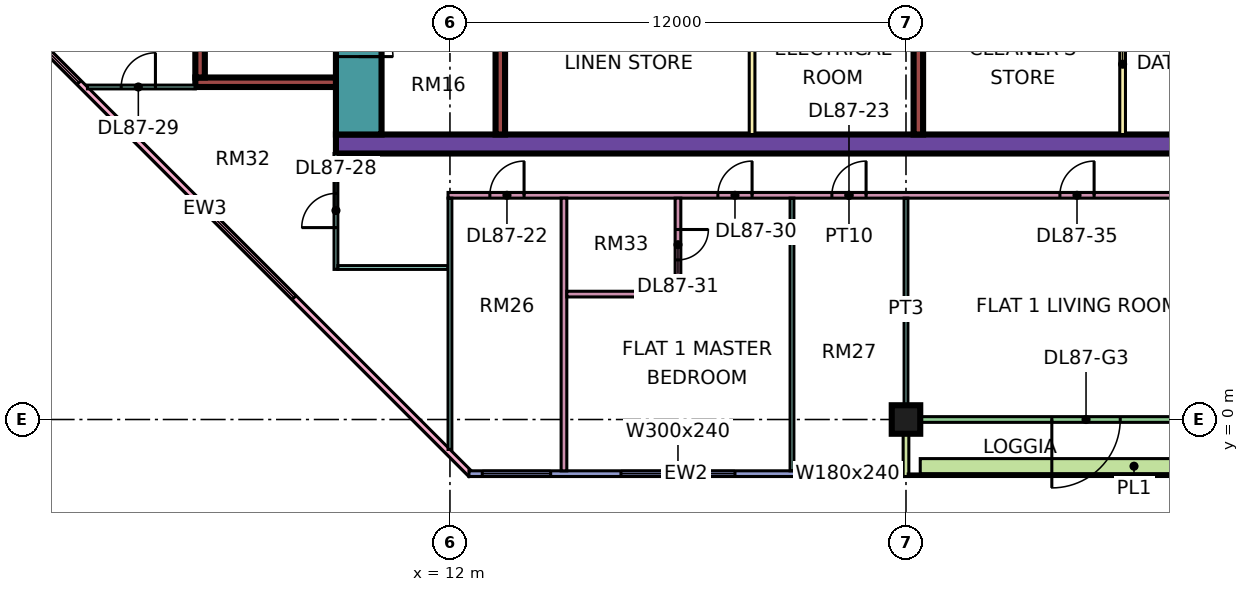
"""IFC4 building model, lengths in metres.
Left out: names, types, materials, properties, quantities, classifications, styles, units other than length and angle.
Written with IfcOpenShell. Run it as: python <this file> out.ifc"""

import sys

from ifc_helpers import new_model, si_unit, direction, frame, frame_2d, origin, origin_2d, place, context, subcontext, project, spatial, rectangle, extrude, element, fill, save


model = new_model("IFC4")
c1 = context("Model", 3, precision=1e-05, world=origin(), true_north=direction((0.0, 1.0)))
c2 = subcontext(c1, "Body", "Model", "MODEL_VIEW")
j1 = project(units=[si_unit("LENGTHUNIT", "METRE"), si_unit("PLANEANGLEUNIT", "RADIAN")], contexts=[c1])
p1 = place(None, origin())
s1 = spatial("IfcSite", under=j1, at=p1, CompositionType="ELEMENT")
p2 = place(p1, origin())
s2 = spatial("IfcBuilding", under=s1, at=p2, CompositionType="ELEMENT")
p3 = place(p2, frame((0.0, 0.0, 372.65)))
s3 = spatial("IfcBuildingStorey", under=s2, at=p3, CompositionType="ELEMENT", Elevation=372.65)
p4 = place(p3, frame((24.0, 0.0, 0.0), z_axis=(0.0, 0.0, 1.0), x_axis=(1.0, 0.0, 0.0)))
e1 = element("IfcColumn", 1, at=p4, inside=s3, PredefinedType="COLUMN", context=c2, shape_type="SweptSolid", body=[
    extrude(rectangle(XDim=0.75, YDim=0.75, at=origin_2d()), origin(), (0.0, 0.0, 1.0), 3.75),
])
p5 = place(p3, frame((9.0, 7.25, 0.0), z_axis=(0.0, 0.0, 1.0), x_axis=(1.0, 0.0, 0.0)))
e2 = element("IfcWall", 2, at=p5, inside=s3, PredefinedType="SHEAR", context=c2, shape_type="SweptSolid", body=[
    extrude(rectangle(XDim=25.0, YDim=0.5, at=frame_2d((12.5, 0.0))), origin(), (0.0, 0.0, 1.0), 3.75),
])
p6 = place(p3, frame((9.6, 7.5, 0.0), z_axis=(0.0, 0.0, 1.0), x_axis=(0.0, 1.0, 0.0)))
e3 = element("IfcWall", 3, at=p6, inside=s3, PredefinedType="SHEAR", context=c2, shape_type="SweptSolid", body=[
    extrude(rectangle(XDim=12.0, YDim=1.2, at=frame_2d((6.0, 0.0))), origin(), (0.0, 0.0, 1.0), 3.75),
])
p7 = place(p6, frame((4.375, 0.0, 0.0)))
e4 = element("IfcOpeningElement", 4, at=p7, cuts=e3, PredefinedType="OPENING", context=c2, shape_type="SweptSolid", body=[
    extrude(rectangle(XDim=1.1, YDim=2.2, at=frame_2d((0.55, 1.1))), frame((0.0, 0.61, 0.0), z_axis=(0.0, -1.0, 0.0), x_axis=(1.0, 0.0, 0.0)), (0.0, 0.0, 1.0), 1.22),
])
p8 = place(p6, frame((6.875, 0.0, 0.0)))
e5 = element("IfcOpeningElement", 5, at=p8, cuts=e3, PredefinedType="OPENING", context=c2, shape_type="SweptSolid", body=[
    extrude(rectangle(XDim=1.1, YDim=2.2, at=frame_2d((0.55, 1.1))), frame((0.0, 0.61, 0.0), z_axis=(0.0, -1.0, 0.0), x_axis=(1.0, 0.0, 0.0)), (0.0, 0.0, 1.0), 1.22),
])
p9 = place(p6, frame((9.85, 0.0, 0.0)))
e6 = element("IfcOpeningElement", 6, at=p9, cuts=e3, PredefinedType="OPENING", context=c2, shape_type="SweptSolid", body=[
    extrude(rectangle(XDim=1.1, YDim=2.2, at=frame_2d((0.55, 1.1))), frame((0.0, 0.61, 0.0), z_axis=(0.0, -1.0, 0.0), x_axis=(1.0, 0.0, 0.0)), (0.0, 0.0, 1.0), 1.22),
])
p10 = place(p6, frame((2.05, 0.0, 0.0)))
e7 = element("IfcOpeningElement", 7, at=p10, cuts=e3, PredefinedType="OPENING", context=c2, shape_type="SweptSolid", body=[
    extrude(rectangle(XDim=0.9, YDim=2.1, at=frame_2d((0.45, 1.05))), frame((0.0, 0.61, 0.0), z_axis=(0.0, -1.0, 0.0), x_axis=(1.0, 0.0, 0.0)), (0.0, 0.0, 1.0), 1.22),
])
p11 = place(p3, frame((13.325, 7.5, 0.0), z_axis=(0.0, 0.0, 1.0), x_axis=(0.0, 1.0, 0.0)))
e8 = element("IfcWall", 8, at=p11, inside=s3, PredefinedType="SHEAR", context=c2, shape_type="SweptSolid", body=[
    extrude(rectangle(XDim=12.0, YDim=0.25, at=frame_2d((6.0, 0.0))), origin(), (0.0, 0.0, 1.0), 3.75),
])
for number, where, z_axis, x_axis in (
    (9, (24.325, 7.5, 0.0), (0.0, 0.0, 1.0), (0.0, 1.0, 0.0)),
    (10, (5.3, 8.875, 0.0), (0.0, 0.0, 1.0), (1.0, 0.0, 0.0)),
):
    element("IfcWall", number, at=place(p3, frame(where, z_axis=z_axis, x_axis=x_axis)), inside=s3, PredefinedType="SHEAR", context=c2, shape_type="SweptSolid", body=[
        extrude(rectangle(XDim=3.7, YDim=0.25, at=frame_2d((1.85, 0.0))), origin(), (0.0, 0.0, 1.0), 3.75),
    ])
p12 = place(p3, frame((5.425, 9.0, 0.0), z_axis=(0.0, 0.0, 1.0), x_axis=(0.0, 1.0, 0.0)))
e11 = element("IfcWall", 11, at=p12, inside=s3, PredefinedType="SHEAR", context=c2, shape_type="SweptSolid", body=[
    extrude(rectangle(XDim=4.0, YDim=0.25, at=frame_2d((2.0, 0.0))), origin(), (0.0, 0.0, 1.0), 3.75),
])
p13 = place(p3, frame((-1.447, 12.553, 0.0), z_axis=(0.0, 0.0, 1.0), x_axis=(0.707106781187, -0.707106781187, 0.0)))
e12 = element("IfcWall", 12, at=p13, inside=s3, PredefinedType="SOLIDWALL", context=c2, shape_type="SweptSolid", body=[
    extrude(rectangle(XDim=19.799, YDim=0.15, at=frame_2d((9.899, 0.0))), origin(), (0.0, 0.0, 1.0), 3.35),
])
p14 = place(p13, frame((2.212, 0.0, 0.45)))
e13 = element("IfcOpeningElement", 13, at=p14, cuts=e12, PredefinedType="OPENING", context=c2, shape_type="SweptSolid", body=[
    extrude(rectangle(XDim=3.0, YDim=2.4, at=frame_2d((1.5, 1.2))), frame((0.0, 0.085, 0.0), z_axis=(0.0, -1.0, 0.0), x_axis=(1.0, 0.0, 0.0)), (0.0, 0.0, 1.0), 0.17),
])
p15 = place(p13, frame((10.216, 0.0, 0.45)))
e14 = element("IfcOpeningElement", 14, at=p15, cuts=e12, PredefinedType="OPENING", context=c2, shape_type="SweptSolid", body=[
    extrude(rectangle(XDim=3.0, YDim=2.4, at=frame_2d((1.5, 1.2))), frame((0.0, 0.085, 0.0), z_axis=(0.0, -1.0, 0.0), x_axis=(1.0, 0.0, 0.0)), (0.0, 0.0, 1.0), 0.17),
])
p16 = place(p3, frame((12.5, -1.425, 0.0), z_axis=(0.0, 0.0, 1.0), x_axis=(1.0, 0.0, 0.0)))
e15 = element("IfcWall", 15, at=p16, inside=s3, PredefinedType="SOLIDWALL", context=c2, shape_type="SweptSolid", body=[
    extrude(rectangle(XDim=11.425, YDim=0.15, at=frame_2d((5.712, 0.0))), origin(), (0.0, 0.0, 1.0), 3.35),
])
p17 = place(p16, frame((0.35, 0.0, 0.45)))
e16 = element("IfcOpeningElement", 16, at=p17, cuts=e15, PredefinedType="OPENING", context=c2, shape_type="SweptSolid", body=[
    extrude(rectangle(XDim=1.8, YDim=2.4, at=frame_2d((0.9, 1.2))), frame((0.0, 0.085, 0.0), z_axis=(0.0, -1.0, 0.0), x_axis=(1.0, 0.0, 0.0)), (0.0, 0.0, 1.0), 0.17),
])
p18 = place(p16, frame((4.0, 0.0, 0.45)))
e17 = element("IfcOpeningElement", 17, at=p18, cuts=e15, PredefinedType="OPENING", context=c2, shape_type="SweptSolid", body=[
    extrude(rectangle(XDim=3.0, YDim=2.4, at=frame_2d((1.5, 1.2))), frame((0.0, 0.085, 0.0), z_axis=(0.0, -1.0, 0.0), x_axis=(1.0, 0.0, 0.0)), (0.0, 0.0, 1.0), 0.17),
])
p19 = place(p16, frame((9.062, 0.0, 0.45)))
e18 = element("IfcOpeningElement", 18, at=p19, cuts=e15, PredefinedType="OPENING", context=c2, shape_type="SweptSolid", body=[
    extrude(rectangle(XDim=1.8, YDim=2.4, at=frame_2d((0.9, 1.2))), frame((0.0, 0.085, 0.0), z_axis=(0.0, -1.0, 0.0), x_axis=(1.0, 0.0, 0.0)), (0.0, 0.0, 1.0), 0.17),
])
p20 = place(p3, frame((24.075, 0.0, 0.0), z_axis=(0.0, 0.0, 1.0), x_axis=(1.0, 0.0, 0.0)))
e19 = element("IfcWall", 19, at=p20, inside=s3, PredefinedType="SOLIDWALL", context=c2, shape_type="SweptSolid", body=[
    extrude(rectangle(XDim=11.85, YDim=0.15, at=frame_2d((5.925, 0.0))), origin(), (0.0, 0.0, 1.0), 3.35),
])
p21 = place(p20, frame((3.762, 0.0, 0.0)))
e20 = element("IfcOpeningElement", 20, at=p21, cuts=e19, PredefinedType="OPENING", context=c2, shape_type="SweptSolid", body=[
    extrude(rectangle(XDim=1.8, YDim=2.4, at=frame_2d((0.9, 1.2))), frame((0.0, 0.085, 0.0), z_axis=(0.0, -1.0, 0.0), x_axis=(1.0, 0.0, 0.0)), (0.0, 0.0, 1.0), 0.17),
])
p22 = place(p20, frame((9.288, 0.0, 0.45)))
e21 = element("IfcOpeningElement", 21, at=p22, cuts=e19, PredefinedType="OPENING", context=c2, shape_type="SweptSolid", body=[
    extrude(rectangle(XDim=1.8, YDim=2.4, at=frame_2d((0.9, 1.2))), frame((0.0, 0.085, 0.0), z_axis=(0.0, -1.0, 0.0), x_axis=(1.0, 0.0, 0.0)), (0.0, 0.0, 1.0), 0.17),
])
p23 = place(p3, frame((24.0, -1.5, 0.0), z_axis=(0.0, 0.0, 1.0), x_axis=(0.0, 1.0, 0.0)))
e22 = element("IfcWall", 22, at=p23, inside=s3, PredefinedType="SOLIDWALL", context=c2, shape_type="SweptSolid", body=[
    extrude(rectangle(XDim=1.5, YDim=0.15, at=frame_2d((0.75, 0.0))), origin(), (0.0, 0.0, 1.0), 3.35),
])
p24 = place(p3, frame((24.375, -1.229, 0.0), z_axis=(0.0, 0.0, 1.0), x_axis=(1.0, 0.0, 0.0)))
e23 = element("IfcWall", 23, at=p24, inside=s3, PredefinedType="SOLIDWALL", context=c2, shape_type="SweptSolid", body=[
    extrude(rectangle(XDim=11.25, YDim=0.4, at=frame_2d((5.625, 0.0))), origin(), (0.0, 0.0, 1.0), 0.7),
])
for number, where, z_axis, x_axis in (
    (24, (19.95, 7.5, 0.0), (0.0, 0.0, 1.0), (0.0, 1.0, 0.0)),
    (25, (29.7, 7.5, 0.0), (0.0, 0.0, 1.0), (0.0, 1.0, 0.0)),
):
    element("IfcWall", number, at=place(p3, frame(where, z_axis=z_axis, x_axis=x_axis)), inside=s3, PredefinedType="PARTITIONING", context=c2, shape_type="SweptSolid", body=[
        extrude(rectangle(XDim=3.7, YDim=0.15, at=frame_2d((1.85, 0.0))), origin(), (0.0, 0.0, 1.0), 3.35),
    ])
p25 = place(p3, frame((2.461, 8.75, 0.0), z_axis=(0.0, 0.0, 1.0), x_axis=(1.0, 0.0, 0.0)))
e26 = element("IfcWall", 26, at=p25, inside=s3, PredefinedType="PARTITIONING", context=c2, shape_type="SweptSolid", body=[
    extrude(rectangle(XDim=2.839, YDim=0.1, at=frame_2d((1.419, 0.0))), origin(), (0.0, 0.0, 1.0), 3.35),
])
p26 = place(p25, frame((0.889, 0.0, 0.0)))
e27 = element("IfcOpeningElement", 27, at=p26, cuts=e26, PredefinedType="OPENING", context=c2, shape_type="SweptSolid", body=[
    extrude(rectangle(XDim=0.9, YDim=2.1, at=frame_2d((0.45, 1.05))), frame((0.0, 0.06, 0.0), z_axis=(0.0, -1.0, 0.0), x_axis=(1.0, 0.0, 0.0)), (0.0, 0.0, 1.0), 0.12),
])
p27 = place(p3, frame((9.0, 3.95, 0.0), z_axis=(0.0, 0.0, 1.0), x_axis=(0.0, 1.0, 0.0)))
e28 = element("IfcWall", 28, at=p27, inside=s3, PredefinedType="PARTITIONING", context=c2, shape_type="SweptSolid", body=[
    extrude(rectangle(XDim=3.05, YDim=0.1, at=frame_2d((1.525, 0.0))), origin(), (0.0, 0.0, 1.0), 3.35),
])
p28 = place(p27, frame((1.1, 0.0, 0.0)))
e29 = element("IfcOpeningElement", 29, at=p28, cuts=e28, PredefinedType="OPENING", context=c2, shape_type="SweptSolid", body=[
    extrude(rectangle(XDim=0.9, YDim=2.1, at=frame_2d((0.45, 1.05))), frame((0.0, 0.06, 0.0), z_axis=(0.0, -1.0, 0.0), x_axis=(1.0, 0.0, 0.0)), (0.0, 0.0, 1.0), 0.12),
])
p29 = place(p3, frame((9.05, 4.0, 0.0), z_axis=(0.0, 0.0, 1.0), x_axis=(1.0, 0.0, 0.0)))
e30 = element("IfcWall", 30, at=p29, inside=s3, PredefinedType="PARTITIONING", context=c2, shape_type="SweptSolid", body=[
    extrude(rectangle(XDim=2.9, YDim=0.1, at=frame_2d((1.45, 0.0))), origin(), (0.0, 0.0, 1.0), 3.35),
])
p30 = place(p3, frame((11.95, 5.9, 0.0), z_axis=(0.0, 0.0, 1.0), x_axis=(1.0, 0.0, 0.0)))
e31 = element("IfcWall", 31, at=p30, inside=s3, PredefinedType="PARTITIONING", context=c2, shape_type="SweptSolid", body=[
    extrude(rectangle(XDim=21.1, YDim=0.15, at=frame_2d((10.55, 0.0))), origin(), (0.0, 0.0, 1.0), 3.35),
])
p31 = place(p30, frame((1.1, 0.0, 0.0)))
e32 = element("IfcOpeningElement", 32, at=p31, cuts=e31, PredefinedType="OPENING", context=c2, shape_type="SweptSolid", body=[
    extrude(rectangle(XDim=0.9, YDim=2.1, at=frame_2d((0.45, 1.05))), frame((0.0, 0.085, 0.0), z_axis=(0.0, -1.0, 0.0), x_axis=(1.0, 0.0, 0.0)), (0.0, 0.0, 1.0), 0.17),
])
p32 = place(p30, frame((10.1, 0.0, 0.0)))
e33 = element("IfcOpeningElement", 33, at=p32, cuts=e31, PredefinedType="OPENING", context=c2, shape_type="SweptSolid", body=[
    extrude(rectangle(XDim=0.9, YDim=2.1, at=frame_2d((0.45, 1.05))), frame((0.0, 0.085, 0.0), z_axis=(0.0, -1.0, 0.0), x_axis=(1.0, 0.0, 0.0)), (0.0, 0.0, 1.0), 0.17),
])
p33 = place(p30, frame((7.1, 0.0, 0.0)))
e34 = element("IfcOpeningElement", 34, at=p33, cuts=e31, PredefinedType="OPENING", context=c2, shape_type="SweptSolid", body=[
    extrude(rectangle(XDim=0.9, YDim=2.1, at=frame_2d((0.45, 1.05))), frame((0.0, 0.085, 0.0), z_axis=(0.0, -1.0, 0.0), x_axis=(1.0, 0.0, 0.0)), (0.0, 0.0, 1.0), 0.17),
])
p34 = place(p30, frame((16.1, 0.0, 0.0)))
e35 = element("IfcOpeningElement", 35, at=p34, cuts=e31, PredefinedType="OPENING", context=c2, shape_type="SweptSolid", body=[
    extrude(rectangle(XDim=0.9, YDim=2.1, at=frame_2d((0.45, 1.05))), frame((0.0, 0.085, 0.0), z_axis=(0.0, -1.0, 0.0), x_axis=(1.0, 0.0, 0.0)), (0.0, 0.0, 1.0), 0.17),
])
p35 = place(p3, frame((12.0, -0.788, 0.0), z_axis=(0.0, 0.0, 1.0), x_axis=(0.0, 1.0, 0.0)))
e36 = element("IfcWall", 36, at=p35, inside=s3, PredefinedType="PARTITIONING", context=c2, shape_type="SweptSolid", body=[
    extrude(rectangle(XDim=6.613, YDim=0.1, at=frame_2d((3.306, 0.0))), origin(), (0.0, 0.0, 1.0), 3.35),
])
p36 = place(p3, frame((15.0, -1.351, 0.0), z_axis=(0.0, 0.0, 1.0), x_axis=(0.0, 1.0, 0.0)))
e37 = element("IfcWall", 37, at=p36, inside=s3, PredefinedType="PARTITIONING", context=c2, shape_type="SweptSolid", body=[
    extrude(rectangle(XDim=7.176, YDim=0.15, at=frame_2d((3.588, 0.0))), origin(), (0.0, 0.0, 1.0), 3.35),
])
p37 = place(p3, frame((15.075, 3.3, 0.0), z_axis=(0.0, 0.0, 1.0), x_axis=(1.0, 0.0, 0.0)))
e38 = element("IfcWall", 38, at=p37, inside=s3, PredefinedType="PARTITIONING", context=c2, shape_type="SweptSolid", body=[
    extrude(rectangle(XDim=3.0, YDim=0.15, at=frame_2d((1.5, 0.0))), origin(), (0.0, 0.0, 1.0), 3.35),
])
p38 = place(p3, frame((18.0, 3.375, 0.0), z_axis=(0.0, 0.0, 1.0), x_axis=(0.0, 1.0, 0.0)))
e39 = element("IfcWall", 39, at=p38, inside=s3, PredefinedType="PARTITIONING", context=c2, shape_type="SweptSolid", body=[
    extrude(rectangle(XDim=2.45, YDim=0.15, at=frame_2d((1.225, 0.0))), origin(), (0.0, 0.0, 1.0), 3.35),
])
p39 = place(p38, frame((0.825, 0.0, 0.0)))
e40 = element("IfcOpeningElement", 40, at=p39, cuts=e39, PredefinedType="OPENING", context=c2, shape_type="SweptSolid", body=[
    extrude(rectangle(XDim=0.8, YDim=2.1, at=frame_2d((0.4, 1.05))), frame((0.0, 0.085, 0.0), z_axis=(0.0, -1.0, 0.0), x_axis=(1.0, 0.0, 0.0)), (0.0, 0.0, 1.0), 0.17),
])
p40 = place(p3, frame((21.0, -1.351, 0.0), z_axis=(0.0, 0.0, 1.0), x_axis=(0.0, 1.0, 0.0)))
e41 = element("IfcWall", 41, at=p40, inside=s3, PredefinedType="PARTITIONING", context=c2, shape_type="SweptSolid", body=[
    extrude(rectangle(XDim=7.176, YDim=0.1, at=frame_2d((3.588, 0.0))), origin(), (0.0, 0.0, 1.0), 3.35),
])
p41 = place(p3, frame((24.0, 0.0, 0.0), z_axis=(0.0, 0.0, 1.0), x_axis=(0.0, 1.0, 0.0)))
e42 = element("IfcWall", 42, at=p41, inside=s3, PredefinedType="PARTITIONING", context=c2, shape_type="SweptSolid", body=[
    extrude(rectangle(XDim=5.825, YDim=0.1, at=frame_2d((2.913, 0.0))), origin(), (0.0, 0.0, 1.0), 3.35),
])
p42 = place(p14, origin())
e43 = element("IfcWindow", 43, at=p42, inside=s3, PartitioningType="SINGLE_PANEL", PredefinedType="WINDOW", context=c2, shape_type="SweptSolid", body=[
    extrude(rectangle(XDim=3.0, YDim=2.4, at=frame_2d((1.5, 1.2))), frame((0.0, 0.03, 0.0), z_axis=(0.0, -1.0, 0.0), x_axis=(1.0, 0.0, 0.0)), (0.0, 0.0, 1.0), 0.06),
])
fill(e13, e43)
p43 = place(p15, origin())
e44 = element("IfcWindow", 44, at=p43, inside=s3, PartitioningType="SINGLE_PANEL", PredefinedType="WINDOW", context=c2, shape_type="SweptSolid", body=[
    extrude(rectangle(XDim=3.0, YDim=2.4, at=frame_2d((1.5, 1.2))), frame((0.0, 0.03, 0.0), z_axis=(0.0, -1.0, 0.0), x_axis=(1.0, 0.0, 0.0)), (0.0, 0.0, 1.0), 0.06),
])
fill(e14, e44)
p44 = place(p17, origin())
e45 = element("IfcWindow", 45, at=p44, inside=s3, PartitioningType="SINGLE_PANEL", PredefinedType="WINDOW", context=c2, shape_type="SweptSolid", body=[
    extrude(rectangle(XDim=1.8, YDim=2.4, at=frame_2d((0.9, 1.2))), frame((0.0, 0.03, 0.0), z_axis=(0.0, -1.0, 0.0), x_axis=(1.0, 0.0, 0.0)), (0.0, 0.0, 1.0), 0.06),
])
fill(e16, e45)
p45 = place(p18, origin())
e46 = element("IfcWindow", 46, at=p45, inside=s3, PartitioningType="SINGLE_PANEL", PredefinedType="WINDOW", context=c2, shape_type="SweptSolid", body=[
    extrude(rectangle(XDim=3.0, YDim=2.4, at=frame_2d((1.5, 1.2))), frame((0.0, 0.03, 0.0), z_axis=(0.0, -1.0, 0.0), x_axis=(1.0, 0.0, 0.0)), (0.0, 0.0, 1.0), 0.06),
])
fill(e17, e46)
p46 = place(p19, origin())
e47 = element("IfcWindow", 47, at=p46, inside=s3, PartitioningType="SINGLE_PANEL", PredefinedType="WINDOW", context=c2, shape_type="SweptSolid", body=[
    extrude(rectangle(XDim=1.8, YDim=2.4, at=frame_2d((0.9, 1.2))), frame((0.0, 0.03, 0.0), z_axis=(0.0, -1.0, 0.0), x_axis=(1.0, 0.0, 0.0)), (0.0, 0.0, 1.0), 0.06),
])
fill(e18, e47)
p47 = place(p21, frame((1.8, 0.0, 0.0), z_axis=(0.0, 0.0, 1.0), x_axis=(-1.0, 0.0, 0.0)))
e48 = element("IfcDoor", 48, at=p47, inside=s3, OperationType="DOUBLE_DOOR_SINGLE_SWING", PredefinedType="DOOR", context=c2, shape_type="SweptSolid", body=[
    extrude(rectangle(XDim=1.8, YDim=2.4, at=frame_2d((0.9, 1.2))), frame((0.0, 0.025, 0.0), z_axis=(0.0, -1.0, 0.0), x_axis=(1.0, 0.0, 0.0)), (0.0, 0.0, 1.0), 0.05),
])
fill(e20, e48)
p48 = place(p10, frame((0.9, 0.0, 0.0), z_axis=(0.0, 0.0, 1.0), x_axis=(-1.0, 0.0, 0.0)))
e49 = element("IfcDoor", 49, at=p48, inside=s3, OperationType="SINGLE_SWING_LEFT", PredefinedType="DOOR", context=c2, shape_type="SweptSolid", body=[
    extrude(rectangle(XDim=0.9, YDim=2.1, at=frame_2d((0.45, 1.05))), frame((0.0, 0.025, 0.0), z_axis=(0.0, -1.0, 0.0), x_axis=(1.0, 0.0, 0.0)), (0.0, 0.0, 1.0), 0.05),
])
fill(e7, e49)
p49 = place(p31, frame((0.9, 0.0, 0.0), z_axis=(0.0, 0.0, 1.0), x_axis=(-1.0, 0.0, 0.0)))
e50 = element("IfcDoor", 50, at=p49, inside=s3, OperationType="SINGLE_SWING_RIGHT", PredefinedType="DOOR", context=c2, shape_type="SweptSolid", body=[
    extrude(rectangle(XDim=0.9, YDim=2.1, at=frame_2d((0.45, 1.05))), frame((0.0, 0.025, 0.0), z_axis=(0.0, -1.0, 0.0), x_axis=(1.0, 0.0, 0.0)), (0.0, 0.0, 1.0), 0.05),
])
fill(e32, e50)
p50 = place(p32, frame((0.9, 0.0, 0.0), z_axis=(0.0, 0.0, 1.0), x_axis=(-1.0, 0.0, 0.0)))
e51 = element("IfcDoor", 51, at=p50, inside=s3, OperationType="SINGLE_SWING_RIGHT", PredefinedType="DOOR", context=c2, shape_type="SweptSolid", body=[
    extrude(rectangle(XDim=0.9, YDim=2.1, at=frame_2d((0.45, 1.05))), frame((0.0, 0.025, 0.0), z_axis=(0.0, -1.0, 0.0), x_axis=(1.0, 0.0, 0.0)), (0.0, 0.0, 1.0), 0.05),
])
fill(e33, e51)
p51 = place(p28, origin())
e52 = element("IfcDoor", 52, at=p51, inside=s3, OperationType="SINGLE_SWING_LEFT", PredefinedType="DOOR", context=c2, shape_type="SweptSolid", body=[
    extrude(rectangle(XDim=0.9, YDim=2.1, at=frame_2d((0.45, 1.05))), frame((0.0, 0.025, 0.0), z_axis=(0.0, -1.0, 0.0), x_axis=(1.0, 0.0, 0.0)), (0.0, 0.0, 1.0), 0.05),
])
fill(e29, e52)
p52 = place(p26, frame((0.9, 0.0, 0.0), z_axis=(0.0, 0.0, 1.0), x_axis=(-1.0, 0.0, 0.0)))
e53 = element("IfcDoor", 53, at=p52, inside=s3, OperationType="SINGLE_SWING_RIGHT", PredefinedType="DOOR", context=c2, shape_type="SweptSolid", body=[
    extrude(rectangle(XDim=0.9, YDim=2.1, at=frame_2d((0.45, 1.05))), frame((0.0, 0.025, 0.0), z_axis=(0.0, -1.0, 0.0), x_axis=(1.0, 0.0, 0.0)), (0.0, 0.0, 1.0), 0.05),
])
fill(e27, e53)
p53 = place(p33, frame((0.9, 0.0, 0.0), z_axis=(0.0, 0.0, 1.0), x_axis=(-1.0, 0.0, 0.0)))
e54 = element("IfcDoor", 54, at=p53, inside=s3, OperationType="SINGLE_SWING_RIGHT", PredefinedType="DOOR", context=c2, shape_type="SweptSolid", body=[
    extrude(rectangle(XDim=0.9, YDim=2.1, at=frame_2d((0.45, 1.05))), frame((0.0, 0.025, 0.0), z_axis=(0.0, -1.0, 0.0), x_axis=(1.0, 0.0, 0.0)), (0.0, 0.0, 1.0), 0.05),
])
fill(e34, e54)
p54 = place(p39, origin())
e55 = element("IfcDoor", 55, at=p54, inside=s3, OperationType="SINGLE_SWING_RIGHT", PredefinedType="DOOR", context=c2, shape_type="SweptSolid", body=[
    extrude(rectangle(XDim=0.8, YDim=2.1, at=frame_2d((0.4, 1.05))), frame((0.0, 0.025, 0.0), z_axis=(0.0, -1.0, 0.0), x_axis=(1.0, 0.0, 0.0)), (0.0, 0.0, 1.0), 0.05),
])
fill(e40, e55)
p55 = place(p34, frame((0.9, 0.0, 0.0), z_axis=(0.0, 0.0, 1.0), x_axis=(-1.0, 0.0, 0.0)))
e56 = element("IfcDoor", 56, at=p55, inside=s3, OperationType="SINGLE_SWING_RIGHT", PredefinedType="DOOR", context=c2, shape_type="SweptSolid", body=[
    extrude(rectangle(XDim=0.9, YDim=2.1, at=frame_2d((0.45, 1.05))), frame((0.0, 0.025, 0.0), z_axis=(0.0, -1.0, 0.0), x_axis=(1.0, 0.0, 0.0)), (0.0, 0.0, 1.0), 0.05),
])
fill(e35, e56)
save(model, sys.argv[1])
